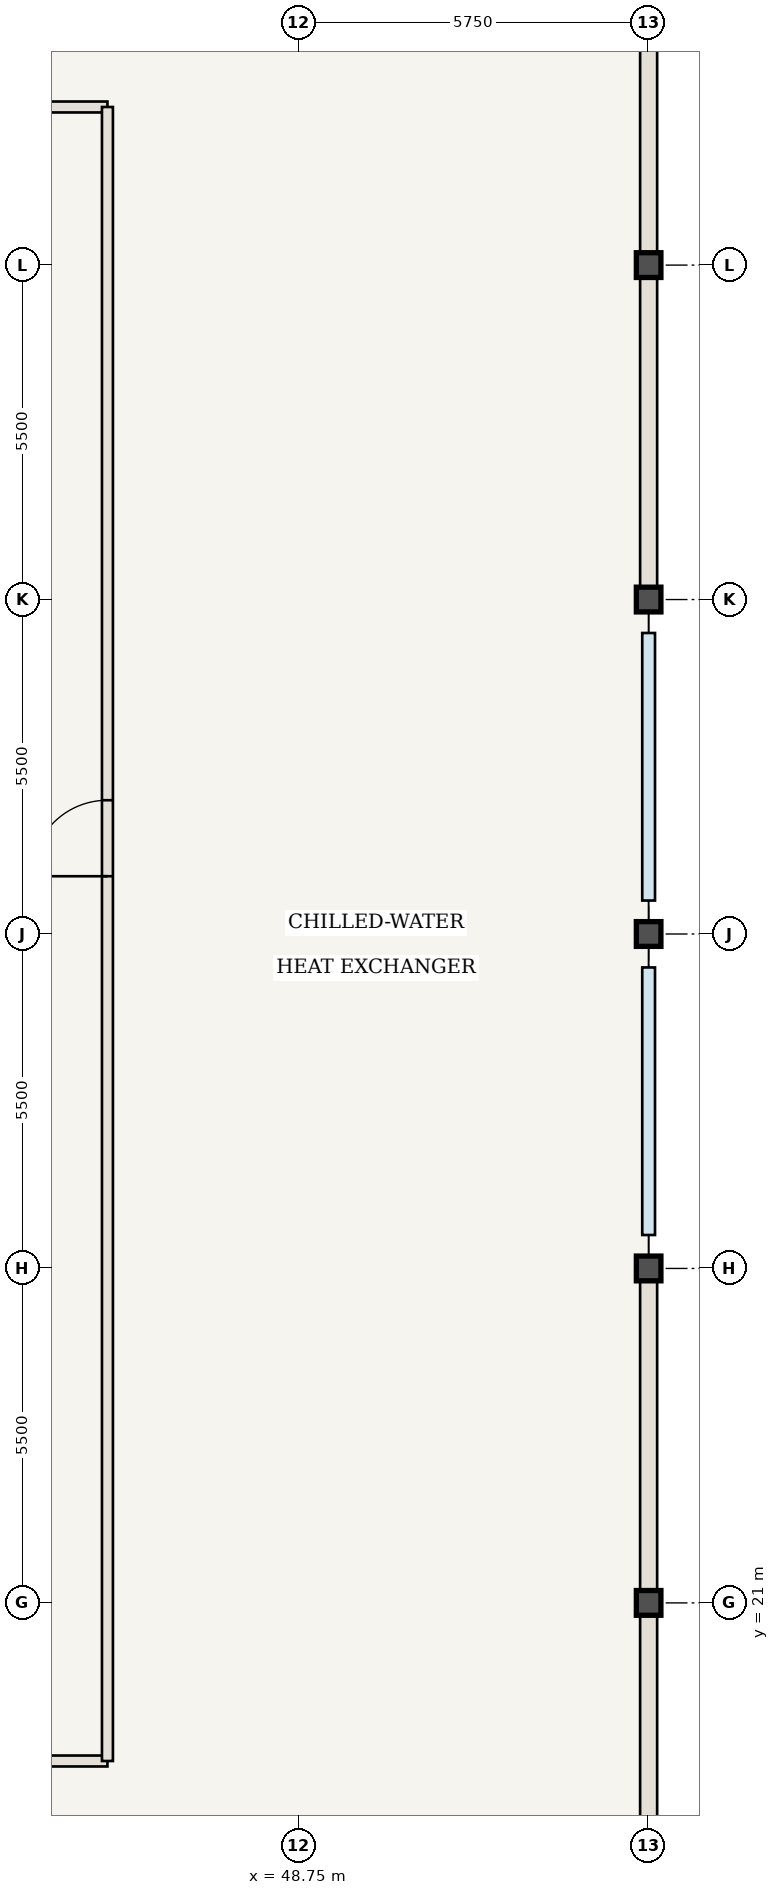
"""IFC4 building model, lengths in metres.
Left out: names, types, materials, properties, quantities, classifications, styles, units other than length and angle.
Written with IfcOpenShell. Run it as: python <this file> out.ifc"""

import sys

from ifc_helpers import new_model, si_unit, direction, frame, frame_2d, origin, origin_2d, place, context, subcontext, project, spatial, rectangle, i_section, extrude, element, fill, save


model = new_model("IFC4")
c1 = context("Model", 3, precision=1e-05, world=origin(), true_north=direction((0.0, 1.0)))
c2 = subcontext(c1, "Body", "Model", "MODEL_VIEW")
j1 = project(units=[si_unit("LENGTHUNIT", "METRE"), si_unit("PLANEANGLEUNIT", "RADIAN")], contexts=[c1])
p1 = place(None, origin())
s1 = spatial("IfcSite", under=j1, at=p1, CompositionType="ELEMENT")
p2 = place(p1, origin())
s2 = spatial("IfcBuilding", under=s1, at=p2, CompositionType="ELEMENT")
p3 = place(p2, frame((0.0, 0.0, 313.25)))
s3 = spatial("IfcBuildingStorey", under=s2, at=p3, CompositionType="ELEMENT", Elevation=313.25)
for number, where, z_axis, x_axis in (
    (1, (54.5, 21.0, 0.0), (0.0, 0.0, 1.0), (1.0, 0.0, 0.0)),
    (2, (54.5, 26.5, 0.0), (0.0, 0.0, 1.0), (1.0, 0.0, 0.0)),
    (3, (54.5, 32.0, 0.0), (0.0, 0.0, 1.0), (1.0, 0.0, 0.0)),
    (4, (54.5, 37.5, 0.0), (0.0, 0.0, 1.0), (1.0, 0.0, 0.0)),
    (5, (54.5, 43.0, 0.0), (0.0, 0.0, 1.0), (1.0, 0.0, 0.0)),
):
    element("IfcColumn", number, at=place(p3, frame(where, z_axis=z_axis, x_axis=x_axis)), inside=s3, PredefinedType="COLUMN", context=c2, shape_type="SweptSolid", body=[
        extrude(i_section(OverallWidth=0.404, OverallDepth=0.407, WebThickness=0.027, FlangeThickness=0.044, at=origin_2d()), origin(), (0.0, 0.0, 1.0), 4.55),
    ])
p4 = place(p3, frame((18.4, 18.4, 0.0), z_axis=(0.0, 0.0, 1.0), x_axis=(1.0, 0.0, 0.0)))
e6 = element("IfcWall", 6, at=p4, inside=s3, PredefinedType="STANDARD", context=c2, shape_type="SweptSolid", body=[
    extrude(rectangle(XDim=27.2, YDim=0.18, at=frame_2d((13.6, 0.0))), origin(), (0.0, 0.0, 1.0), 4.29),
])
p5 = place(p4, frame((4.4, 0.0, 0.0)))
e7 = element("IfcOpeningElement", 7, at=p5, cuts=e6, PredefinedType="OPENING", context=c2, shape_type="SweptSolid", body=[
    extrude(rectangle(XDim=1.25, YDim=2.2, at=frame_2d((0.625, 1.1))), frame((0.0, 0.1, 0.0), z_axis=(0.0, -1.0, 0.0), x_axis=(1.0, 0.0, 0.0)), (0.0, 0.0, 1.0), 0.2),
])
p6 = place(p3, frame((18.4, 45.6, 0.0), z_axis=(0.0, 0.0, 1.0), x_axis=(1.0, 0.0, 0.0)))
e8 = element("IfcWall", 8, at=p6, inside=s3, PredefinedType="STANDARD", context=c2, shape_type="SweptSolid", body=[
    extrude(rectangle(XDim=27.2, YDim=0.18, at=frame_2d((13.6, 0.0))), origin(), (0.0, 0.0, 1.0), 4.29),
])
p7 = place(p6, frame((4.4, 0.0, 0.0)))
e9 = element("IfcOpeningElement", 9, at=p7, cuts=e8, PredefinedType="OPENING", context=c2, shape_type="SweptSolid", body=[
    extrude(rectangle(XDim=1.25, YDim=2.2, at=frame_2d((0.625, 1.1))), frame((0.0, 0.1, 0.0), z_axis=(0.0, -1.0, 0.0), x_axis=(1.0, 0.0, 0.0)), (0.0, 0.0, 1.0), 0.2),
])
p8 = place(p3, frame((45.6, 18.4, 0.0), z_axis=(0.0, 0.0, 1.0), x_axis=(0.0, 1.0, 0.0)))
e10 = element("IfcWall", 10, at=p8, inside=s3, PredefinedType="STANDARD", context=c2, shape_type="SweptSolid", body=[
    extrude(rectangle(XDim=27.2, YDim=0.18, at=frame_2d((13.6, 0.0))), origin(), (0.0, 0.0, 1.0), 4.29),
])
p9 = place(p8, frame((14.55, 0.0, 0.0)))
e11 = element("IfcOpeningElement", 11, at=p9, cuts=e10, PredefinedType="OPENING", context=c2, shape_type="SweptSolid", body=[
    extrude(rectangle(XDim=1.25, YDim=2.2, at=frame_2d((0.625, 1.1))), frame((0.0, 0.1, 0.0), z_axis=(0.0, -1.0, 0.0), x_axis=(1.0, 0.0, 0.0)), (0.0, 0.0, 1.0), 0.2),
])
for number, where, z_axis, x_axis in (
    (12, (54.5, 21.0, 0.0), (0.0, 0.0, 1.0), (0.0, -1.0, 0.0)),
    (13, (54.5, 26.5, 0.0), (0.0, 0.0, 1.0), (0.0, -1.0, 0.0)),
    (14, (54.5, 43.0, 0.0), (0.0, 0.0, 1.0), (0.0, -1.0, 0.0)),
    (15, (54.5, 48.5, 0.0), (0.0, 0.0, 1.0), (0.0, -1.0, 0.0)),
):
    element("IfcWall", number, at=place(p3, frame(where, z_axis=z_axis, x_axis=x_axis)), inside=s3, PredefinedType="USERDEFINED", context=c2, shape_type="SweptSolid", body=[
        extrude(rectangle(XDim=5.5, YDim=0.28, at=frame_2d((2.75, 0.0))), origin(), (0.0, 0.0, 1.0), 3.57),
    ])
p10 = place(p9, origin())
e16 = element("IfcDoor", 16, at=p10, inside=s3, OperationType="SINGLE_SWING_LEFT", PredefinedType="DOOR", context=c2, shape_type="SweptSolid", body=[
    extrude(rectangle(XDim=1.25, YDim=2.2, at=frame_2d((0.625, 1.1))), frame((0.0, 0.025, 0.0), z_axis=(0.0, -1.0, 0.0), x_axis=(1.0, 0.0, 0.0)), (0.0, 0.0, 1.0), 0.05),
])
fill(e11, e16)
save(model, sys.argv[1])
